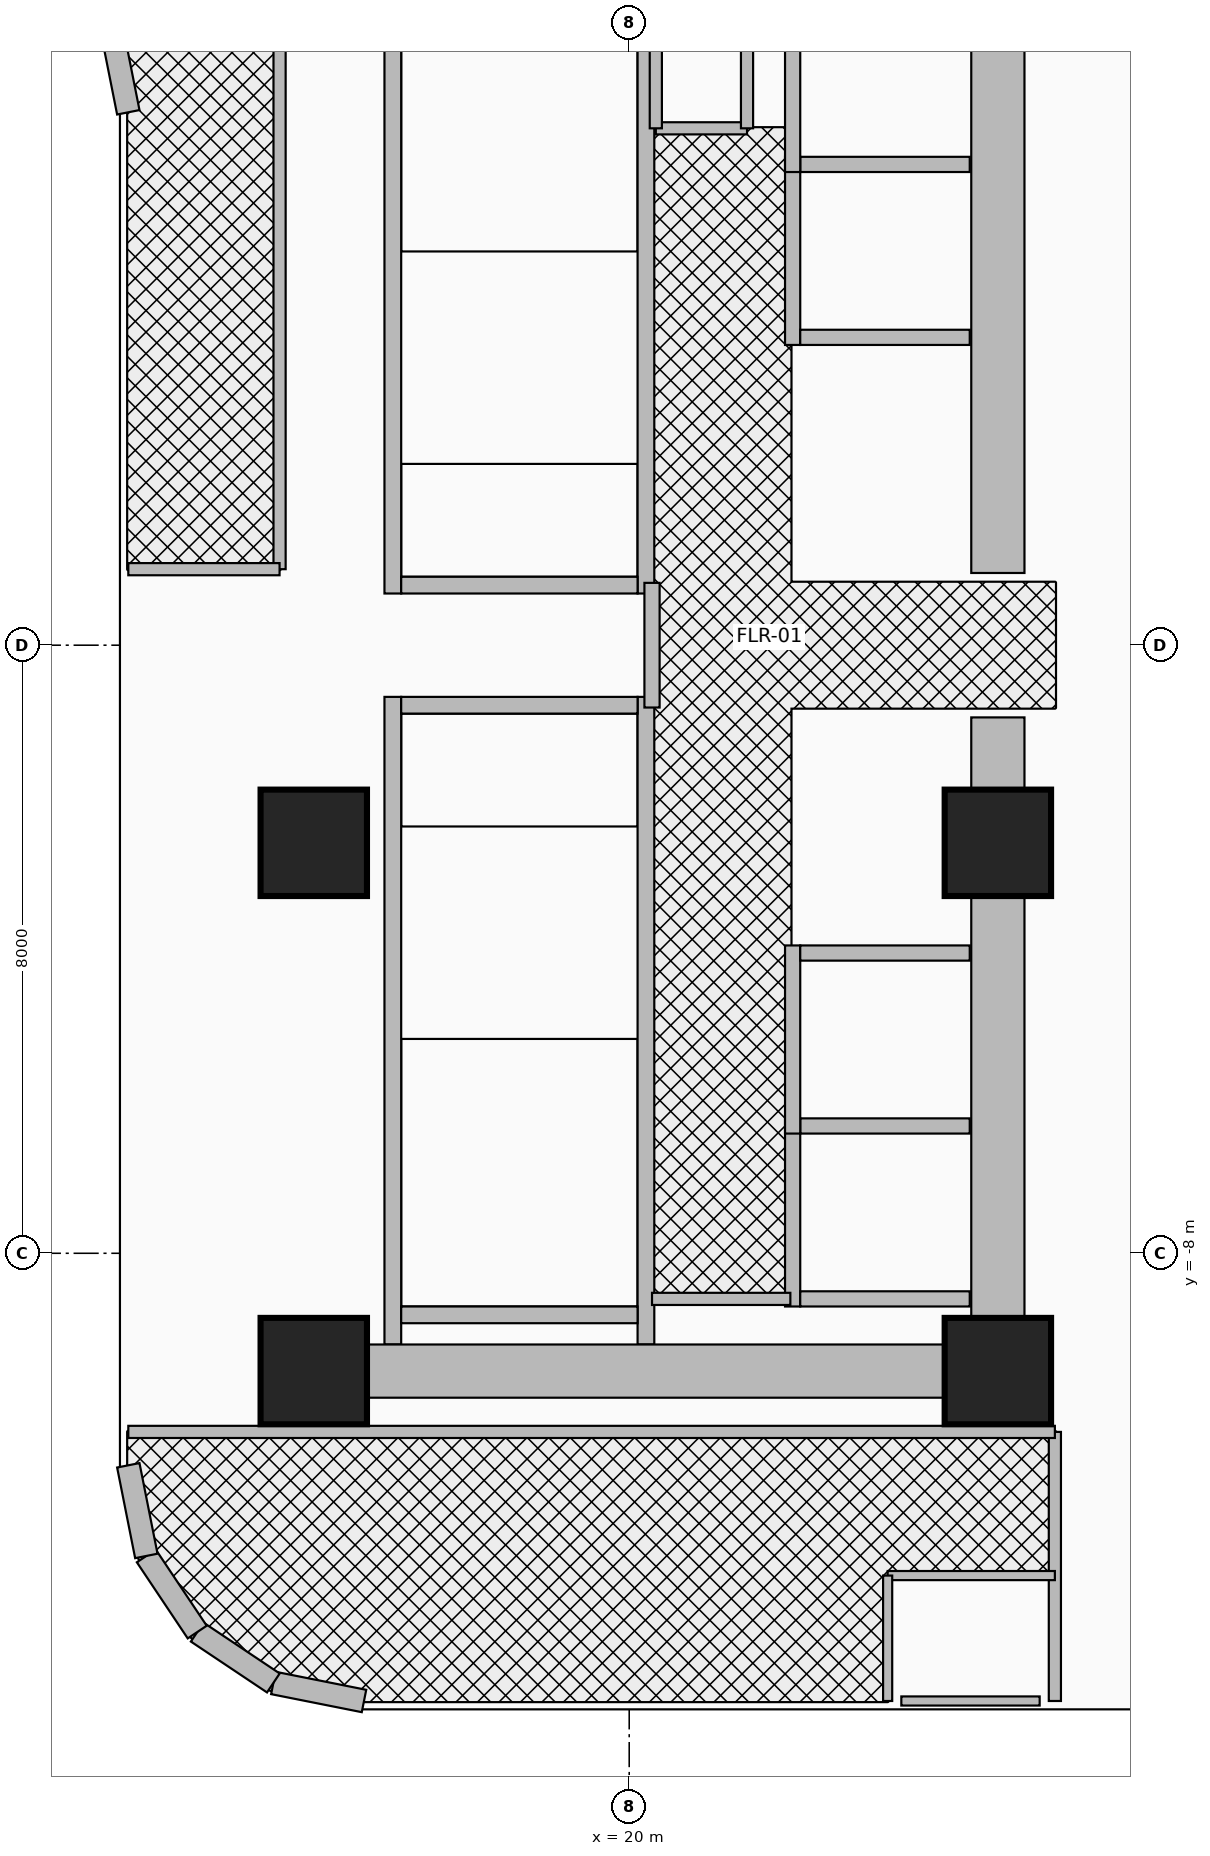
"""IFC4 building model, lengths in metres.
Left out: names, types, materials, properties, quantities, classifications, styles, units other than length and angle.
Written with IfcOpenShell. Run it as: python <this file> out.ifc"""

import sys

from ifc_helpers import new_model, si_unit, direction, frame, frame_2d, origin, origin_2d, place, context, subcontext, project, spatial, rectangle, extrude, source, transform, mapped, element, fill, save


model = new_model("IFC4")
c1 = context("Model", 3, precision=1e-05, world=origin(), true_north=direction((0.0, 1.0)))
c2 = subcontext(c1, "Body", "Model", "MODEL_VIEW")
j1 = project(units=[si_unit("LENGTHUNIT", "METRE"), si_unit("PLANEANGLEUNIT", "RADIAN")], contexts=[c1])
p1 = place(None, origin())
s1 = spatial("IfcSite", under=j1, at=p1, CompositionType="ELEMENT")
p2 = place(p1, origin())
s2 = spatial("IfcBuilding", under=s1, at=p2, CompositionType="ELEMENT")
p3 = place(p2, frame((0.0, 0.0, 26.0)))
s3 = spatial("IfcBuildingStorey", under=s2, at=p3, CompositionType="ELEMENT", Elevation=26.0)
for number, where, z_axis, x_axis in (
    (1, (16.89, 0.68, 0.0), (0.0, 0.0, 1.0), (0.0, 1.0, 0.0)),
    (2, (20.22, 0.68, 0.0), (0.0, 0.0, 1.0), (0.0, 1.0, 0.0)),
):
    element("IfcWall", number, at=place(p3, frame(where, z_axis=z_axis, x_axis=x_axis)), inside=s3, PredefinedType="SHEAR", context=c2, shape_type="SweptSolid", body=[
        extrude(rectangle(XDim=8.52, YDim=0.22, at=frame_2d((4.26, 0.0))), origin(), (0.0, 0.0, 1.0), 3.46),
    ])
p4 = place(p3, frame((17.0, 0.79, 0.0), z_axis=(0.0, 0.0, 1.0), x_axis=(1.0, 0.0, 0.0)))
e3 = element("IfcWall", 3, at=p4, inside=s3, PredefinedType="SHEAR", context=c2, shape_type="SweptSolid", body=[
    extrude(rectangle(XDim=3.11, YDim=0.22, at=frame_2d((1.555, 0.0))), origin(), (0.0, 0.0, 1.0), 3.46),
])
p5 = place(p4, frame((0.95, 0.0, 0.0)))
e4 = element("IfcOpeningElement", 4, at=p5, cuts=e3, PredefinedType="OPENING", context=c2, shape_type="SweptSolid", body=[
    extrude(rectangle(XDim=1.1, YDim=2.15, at=frame_2d((0.55, 1.075))), frame((0.0, 0.125, 0.0), z_axis=(0.0, -1.0, 0.0), x_axis=(1.0, 0.0, 0.0)), (0.0, 0.0, 1.0), 0.25),
])
for number, where, z_axis, x_axis in (
    (5, (16.89, -9.2, 0.0), (0.0, 0.0, 1.0), (0.0, 1.0, 0.0)),
    (6, (20.22, -9.2, 0.0), (0.0, 0.0, 1.0), (0.0, 1.0, 0.0)),
):
    element("IfcWall", number, at=place(p3, frame(where, z_axis=z_axis, x_axis=x_axis)), inside=s3, PredefinedType="SHEAR", context=c2, shape_type="SweptSolid", body=[
        extrude(rectangle(XDim=8.52, YDim=0.22, at=frame_2d((4.26, 0.0))), origin(), (0.0, 0.0, 1.0), 3.46),
    ])
p6 = place(p3, frame((17.0, -8.81, 0.0), z_axis=(0.0, 0.0, 1.0), x_axis=(1.0, 0.0, 0.0)))
e7 = element("IfcWall", 7, at=p6, inside=s3, PredefinedType="SHEAR", context=c2, shape_type="SweptSolid", body=[
    extrude(rectangle(XDim=3.11, YDim=0.22, at=frame_2d((1.555, 0.0))), origin(), (0.0, 0.0, 1.0), 3.46),
])
p7 = place(p3, frame((17.0, -0.79, 0.0), z_axis=(0.0, 0.0, 1.0), x_axis=(1.0, 0.0, 0.0)))
e8 = element("IfcWall", 8, at=p7, inside=s3, PredefinedType="SHEAR", context=c2, shape_type="SweptSolid", body=[
    extrude(rectangle(XDim=3.11, YDim=0.22, at=frame_2d((1.555, 0.0))), origin(), (0.0, 0.0, 1.0), 3.46),
])
p8 = place(p7, frame((0.95, 0.0, 0.0)))
e9 = element("IfcOpeningElement", 9, at=p8, cuts=e8, PredefinedType="OPENING", context=c2, shape_type="SweptSolid", body=[
    extrude(rectangle(XDim=1.1, YDim=2.15, at=frame_2d((0.55, 1.075))), frame((0.0, 0.125, 0.0), z_axis=(0.0, -1.0, 0.0), x_axis=(1.0, 0.0, 0.0)), (0.0, 0.0, 1.0), 0.25),
])
for number, where, z_axis, x_axis in (
    (10, (24.85, -9.9, 0.0), (0.0, 0.0, 1.0), (0.0, 1.0, 0.0)),
    (11, (24.85, 0.95, 0.0), (0.0, 0.0, 1.0), (0.0, 1.0, 0.0)),
):
    element("IfcWall", number, at=place(p3, frame(where, z_axis=z_axis, x_axis=x_axis)), inside=s3, PredefinedType="SHEAR", context=c2, shape_type="SweptSolid", body=[
        extrude(rectangle(XDim=8.95, YDim=0.7, at=frame_2d((4.475, 0.0))), origin(), (0.0, 0.0, 1.0), 3.46),
    ])
p9 = place(p3, frame((15.85, -9.55, 0.0), z_axis=(0.0, 0.0, 1.0), x_axis=(1.0, 0.0, 0.0)))
e12 = element("IfcWall", 12, at=p9, inside=s3, PredefinedType="SHEAR", context=c2, shape_type="SweptSolid", body=[
    extrude(rectangle(XDim=9.0, YDim=0.7, at=frame_2d((4.5, 0.0))), origin(), (0.0, 0.0, 1.0), 3.46),
])
m1 = source(origin(), c2, "Body", "SweptSolid", [
    extrude(rectangle(XDim=1.4, YDim=1.4, at=origin_2d()), origin(), (0.0, 0.0, 1.0), 3.7),
])
for number, where, z_axis, x_axis in (
    (13, (15.85, -9.55, 0.0), (0.0, 0.0, 1.0), (1.0, 0.0, 0.0)),
    (14, (24.85, -9.55, 0.0), (0.0, 0.0, 1.0), (1.0, 0.0, 0.0)),
    (15, (15.85, -2.6, 0.0), (0.0, 0.0, 1.0), (1.0, 0.0, 0.0)),
    (16, (24.85, -2.6, 0.0), (0.0, 0.0, 1.0), (1.0, 0.0, 0.0)),
):
    element("IfcColumn", number, at=place(p3, frame(where, z_axis=z_axis, x_axis=x_axis)), inside=s3, PredefinedType="COLUMN", context=c2, shape_type="MappedRepresentation", body=[
        mapped(m1, transform((0.0, 0.0, 0.0), x_axis=(1.0, 0.0, 0.0), y_axis=(0.0, 1.0, 0.0), z_axis=(0.0, 0.0, 1.0), scale=1.0)),
    ])
p10 = place(p3, frame((16.511, -13.89, 0.0), z_axis=(0.0, 0.0, 1.0), x_axis=(-0.980804027463, 0.194996050505, 0.0)))
e17 = element("IfcWall", 17, at=p10, inside=s3, PredefinedType="SOLIDWALL", context=c2, shape_type="SweptSolid", body=[
    extrude(rectangle(XDim=1.216, YDim=0.3, at=frame_2d((0.608, 0.0))), origin(), (0.0, 0.0, 1.0), 3.46),
])
for number, where, z_axis, x_axis in (
    (18, (15.318, -13.653, 0.0), (0.0, 0.0, 1.0), (-0.831, 0.556, 0.0)),
    (19, (14.317, -12.983, 0.0), (0.0, 0.0, 1.0), (-0.556, 0.831, 0.0)),
):
    element("IfcWall", number, at=place(p3, frame(where, z_axis=z_axis, x_axis=x_axis)), inside=s3, PredefinedType="SOLIDWALL", context=c2, shape_type="SweptSolid", body=[
        extrude(rectangle(XDim=1.205, YDim=0.3, at=frame_2d((0.603, 0.0))), origin(), (0.0, 0.0, 1.0), 3.46),
    ])
p11 = place(p3, frame((13.647, -11.982, 0.0), z_axis=(0.0, 0.0, 1.0), x_axis=(-0.195189223115, 0.980765602568, 0.0)))
e20 = element("IfcWall", 20, at=p11, inside=s3, PredefinedType="SOLIDWALL", context=c2, shape_type="SweptSolid", body=[
    extrude(rectangle(XDim=1.216, YDim=0.3, at=frame_2d((0.608, 0.0))), origin(), (0.0, 0.0, 1.0), 3.46),
])
p12 = place(p3, frame((13.41, 7.011, 0.0), z_axis=(0.0, 0.0, 1.0), x_axis=(-0.195090163074, 0.980785312019, 0.0)))
e21 = element("IfcWall", 21, at=p12, inside=s3, PredefinedType="SOLIDWALL", context=c2, shape_type="SweptSolid", body=[
    extrude(rectangle(XDim=1.281, YDim=0.3, at=frame_2d((0.641, 0.0))), origin(), (0.0, 0.0, 1.0), 3.46),
])
p13 = place(p3, frame((22.15, -8.7, 0.0), z_axis=(0.0, 0.0, 1.0), x_axis=(0.0, 1.0, 0.0)))
e22 = element("IfcWall", 22, at=p13, inside=s3, PredefinedType="MOVABLE", context=c2, shape_type="SweptSolid", body=[
    extrude(rectangle(XDim=2.475, YDim=0.2, at=frame_2d((1.237, 0.0))), origin(), (0.0, 0.0, 1.0), 3.46),
])
p14 = place(p13, frame((0.688, 0.0, 0.0)))
e23 = element("IfcOpeningElement", 23, at=p14, cuts=e22, PredefinedType="OPENING", context=c2, shape_type="SweptSolid", body=[
    extrude(rectangle(XDim=1.1, YDim=2.1, at=frame_2d((0.55, 1.05))), frame((0.0, 0.115, 0.0), z_axis=(0.0, -1.0, 0.0), x_axis=(1.0, 0.0, 0.0)), (0.0, 0.0, 1.0), 0.23),
])
for number, where, z_axis, x_axis in (
    (24, (22.25, -8.6, 0.0), (0.0, 0.0, 1.0), (1.0, 0.0, 0.0)),
    (25, (22.25, -6.325, 0.0), (0.0, 0.0, 1.0), (1.0, 0.0, 0.0)),
):
    element("IfcWall", number, at=place(p3, frame(where, z_axis=z_axis, x_axis=x_axis)), inside=s3, PredefinedType="MOVABLE", context=c2, shape_type="SweptSolid", body=[
        extrude(rectangle(XDim=2.23, YDim=0.2, at=frame_2d((1.115, 0.0))), origin(), (0.0, 0.0, 1.0), 3.46),
    ])
p15 = place(p3, frame((22.15, -6.425, 0.0), z_axis=(0.0, 0.0, 1.0), x_axis=(0.0, 1.0, 0.0)))
e26 = element("IfcWall", 26, at=p15, inside=s3, PredefinedType="MOVABLE", context=c2, shape_type="SweptSolid", body=[
    extrude(rectangle(XDim=2.475, YDim=0.2, at=frame_2d((1.238, 0.0))), origin(), (0.0, 0.0, 1.0), 3.46),
])
p16 = place(p15, frame((0.688, 0.0, 0.0)))
e27 = element("IfcOpeningElement", 27, at=p16, cuts=e26, PredefinedType="OPENING", context=c2, shape_type="SweptSolid", body=[
    extrude(rectangle(XDim=1.1, YDim=2.1, at=frame_2d((0.55, 1.05))), frame((0.0, 0.115, 0.0), z_axis=(0.0, -1.0, 0.0), x_axis=(1.0, 0.0, 0.0)), (0.0, 0.0, 1.0), 0.23),
])
p17 = place(p3, frame((22.25, -4.05, 0.0), z_axis=(0.0, 0.0, 1.0), x_axis=(1.0, 0.0, 0.0)))
e28 = element("IfcWall", 28, at=p17, inside=s3, PredefinedType="MOVABLE", context=c2, shape_type="SweptSolid", body=[
    extrude(rectangle(XDim=2.23, YDim=0.2, at=frame_2d((1.115, 0.0))), origin(), (0.0, 0.0, 1.0), 3.46),
])
p18 = place(p3, frame((22.15, 3.95, 0.0), z_axis=(0.0, 0.0, 1.0), x_axis=(0.0, 1.0, 0.0)))
e29 = element("IfcWall", 29, at=p18, inside=s3, PredefinedType="MOVABLE", context=c2, shape_type="SweptSolid", body=[
    extrude(rectangle(XDim=2.475, YDim=0.2, at=frame_2d((1.238, 0.0))), origin(), (0.0, 0.0, 1.0), 3.46),
])
for number, where, z_axis, x_axis in (
    (30, (22.25, 4.05, 0.0), (0.0, 0.0, 1.0), (1.0, 0.0, 0.0)),
    (31, (22.25, 6.325, 0.0), (0.0, 0.0, 1.0), (1.0, 0.0, 0.0)),
):
    element("IfcWall", number, at=place(p3, frame(where, z_axis=z_axis, x_axis=x_axis)), inside=s3, PredefinedType="MOVABLE", context=c2, shape_type="SweptSolid", body=[
        extrude(rectangle(XDim=2.23, YDim=0.2, at=frame_2d((1.115, 0.0))), origin(), (0.0, 0.0, 1.0), 2.245),
    ])
p19 = place(p3, frame((22.15, 6.225, 0.0), z_axis=(0.0, 0.0, 1.0), x_axis=(0.0, 1.0, 0.0)))
e32 = element("IfcWall", 32, at=p19, inside=s3, PredefinedType="MOVABLE", context=c2, shape_type="SweptSolid", body=[
    extrude(rectangle(XDim=2.475, YDim=0.2, at=frame_2d((1.237, 0.0))), origin(), (0.0, 0.0, 1.0), 3.46),
])
p20 = place(p3, frame((20.3, -0.82, 0.0), z_axis=(0.0, 0.0, 1.0), x_axis=(0.0, 1.0, 0.0)))
e33 = element("IfcWall", 33, at=p20, inside=s3, PredefinedType="PARTITIONING", context=c2, shape_type="SweptSolid", body=[
    extrude(rectangle(XDim=1.64, YDim=0.2, at=frame_2d((0.82, 0.0))), origin(), (0.0, 0.0, 1.0), 3.46),
])
p21 = place(p20, frame((0.295, 0.0, 0.0)))
e34 = element("IfcOpeningElement", 34, at=p21, cuts=e33, PredefinedType="OPENING", context=c2, shape_type="SweptSolid", body=[
    extrude(rectangle(XDim=1.05, YDim=2.15, at=frame_2d((0.525, 1.075))), frame((0.0, 0.115, 0.0), z_axis=(0.0, -1.0, 0.0), x_axis=(1.0, 0.0, 0.0)), (0.0, 0.0, 1.0), 0.23),
])
p22 = place(p3, frame((20.35, 6.8, 0.0), z_axis=(0.0, 0.0, 1.0), x_axis=(1.0, 0.0, 0.0)))
e35 = element("IfcWall", 35, at=p22, inside=s3, PredefinedType="PARTITIONING", context=c2, shape_type="SweptSolid", body=[
    extrude(rectangle(XDim=1.2, YDim=0.16, at=frame_2d((0.6, 0.0))), origin(), (0.0, 0.0, 1.0), 3.46),
])
p23 = place(p22, frame((0.175, 0.0, 0.0)))
e36 = element("IfcOpeningElement", 36, at=p23, cuts=e35, PredefinedType="OPENING", context=c2, shape_type="SweptSolid", body=[
    extrude(rectangle(XDim=0.85, YDim=2.05, at=frame_2d((0.425, 1.025))), frame((0.0, 0.095, 0.0), z_axis=(0.0, -1.0, 0.0), x_axis=(1.0, 0.0, 0.0)), (0.0, 0.0, 1.0), 0.19),
])
for number, where, z_axis, x_axis in (
    (37, (21.55, 6.8, 0.0), (0.0, 0.0, 1.0), (0.0, 1.0, 0.0)),
    (38, (20.35, 6.8, 0.0), (0.0, 0.0, 1.0), (0.0, 1.0, 0.0)),
):
    element("IfcWall", number, at=place(p3, frame(where, z_axis=z_axis, x_axis=x_axis)), inside=s3, PredefinedType="PARTITIONING", context=c2, shape_type="SweptSolid", body=[
        extrude(rectangle(XDim=1.8, YDim=0.16, at=frame_2d((0.9, 0.0))), origin(), (0.0, 0.0, 1.0), 3.46),
    ])
p24 = place(p3, frame((20.3, -8.6, 0.0), z_axis=(0.0, 0.0, 1.0), x_axis=(1.0, 0.0, 0.0)))
e39 = element("IfcWall", 39, at=p24, inside=s3, PredefinedType="PARTITIONING", context=c2, shape_type="SweptSolid", body=[
    extrude(rectangle(XDim=1.82, YDim=0.16, at=frame_2d((0.91, 0.0))), origin(), (0.0, 0.0, 1.0), 3.46),
])
p25 = place(p3, frame((25.6, -13.89, 0.0), z_axis=(0.0, 0.0, 1.0), x_axis=(0.0, 1.0, 0.0)))
e40 = element("IfcWall", 40, at=p25, inside=s3, PredefinedType="PARTITIONING", context=c2, shape_type="SweptSolid", body=[
    extrude(rectangle(XDim=3.54, YDim=0.16, at=frame_2d((1.77, 0.0))), origin(), (0.0, 0.0, 1.0), 3.46),
])
p26 = place(p25, frame((2.12, 0.0, 0.0)))
e41 = element("IfcOpeningElement", 41, at=p26, cuts=e40, PredefinedType="OPENING", context=c2, shape_type="SweptSolid", body=[
    extrude(rectangle(XDim=0.95, YDim=2.15, at=frame_2d((0.475, 1.075))), frame((0.0, 0.095, 0.0), z_axis=(0.0, -1.0, 0.0), x_axis=(1.0, 0.0, 0.0)), (0.0, 0.0, 1.0), 0.19),
])
p27 = place(p3, frame((13.41, -10.35, 0.0), z_axis=(0.0, 0.0, 1.0), x_axis=(1.0, 0.0, 0.0)))
e42 = element("IfcWall", 42, at=p27, inside=s3, PredefinedType="PARTITIONING", context=c2, shape_type="SweptSolid", body=[
    extrude(rectangle(XDim=12.19, YDim=0.16, at=frame_2d((6.095, 0.0))), origin(), (0.0, 0.0, 1.0), 3.46),
])
p28 = place(p3, frame((23.4, -12.24, 0.0), z_axis=(0.0, 0.0, 1.0), x_axis=(1.0, 0.0, 0.0)))
e43 = element("IfcWall", 43, at=p28, inside=s3, PredefinedType="PARTITIONING", context=c2, shape_type="SweptSolid", body=[
    extrude(rectangle(XDim=2.2, YDim=0.12, at=frame_2d((1.1, 0.0))), origin(), (0.0, 0.0, 1.0), 3.46),
])
p29 = place(p3, frame((23.4, -13.89, 0.0), z_axis=(0.0, 0.0, 1.0), x_axis=(0.0, 1.0, 0.0)))
e44 = element("IfcWall", 44, at=p29, inside=s3, PredefinedType="PARTITIONING", context=c2, shape_type="SweptSolid", body=[
    extrude(rectangle(XDim=1.65, YDim=0.12, at=frame_2d((0.825, 0.0))), origin(), (0.0, 0.0, 1.0), 3.46),
])
p30 = place(p29, frame((0.4, 0.0, 0.0)))
e45 = element("IfcOpeningElement", 45, at=p30, cuts=e44, PredefinedType="OPENING", context=c2, shape_type="SweptSolid", body=[
    extrude(rectangle(XDim=0.85, YDim=2.1, at=frame_2d((0.425, 1.05))), frame((0.0, 0.075, 0.0), z_axis=(0.0, -1.0, 0.0), x_axis=(1.0, 0.0, 0.0)), (0.0, 0.0, 1.0), 0.15),
])
p31 = place(p3, frame((23.58, -13.89, 0.0), z_axis=(0.0, 0.0, 1.0), x_axis=(1.0, 0.0, 0.0)))
e46 = element("IfcWall", 46, at=p31, inside=s3, PredefinedType="PARTITIONING", context=c2, shape_type="SweptSolid", body=[
    extrude(rectangle(XDim=1.82, YDim=0.12, at=frame_2d((0.91, 0.0))), origin(), (0.0, 0.0, 1.0), 3.46),
])
p32 = place(p3, frame((15.4, 1.0, 0.0), z_axis=(0.0, 0.0, 1.0), x_axis=(0.0, 1.0, 0.0)))
e47 = element("IfcWall", 47, at=p32, inside=s3, PredefinedType="PARTITIONING", context=c2, shape_type="SweptSolid", body=[
    extrude(rectangle(XDim=9.35, YDim=0.16, at=frame_2d((4.675, 0.0))), origin(), (0.0, 0.0, 1.0), 2.245),
])
p33 = place(p3, frame((13.41, 1.0, 0.0), z_axis=(0.0, 0.0, 1.0), x_axis=(1.0, 0.0, 0.0)))
e48 = element("IfcWall", 48, at=p33, inside=s3, PredefinedType="PARTITIONING", context=c2, shape_type="SweptSolid", body=[
    extrude(rectangle(XDim=1.99, YDim=0.16, at=frame_2d((0.995, 0.0))), origin(), (0.0, 0.0, 1.0), 2.245),
])
p34 = place(p14, origin())
e49 = element("IfcDoor", 49, at=p34, inside=s3, OperationType="DOUBLE_DOOR_SLIDING", PredefinedType="DOOR", context=c2, shape_type="SweptSolid", body=[
    extrude(rectangle(XDim=1.1, YDim=2.1, at=frame_2d((0.55, 1.05))), frame((0.0, 0.025, 0.0), z_axis=(0.0, -1.0, 0.0), x_axis=(1.0, 0.0, 0.0)), (0.0, 0.0, 1.0), 0.05),
])
fill(e23, e49)
p35 = place(p16, origin())
e50 = element("IfcDoor", 50, at=p35, inside=s3, OperationType="DOUBLE_DOOR_SLIDING", PredefinedType="DOOR", context=c2, shape_type="SweptSolid", body=[
    extrude(rectangle(XDim=1.1, YDim=2.1, at=frame_2d((0.55, 1.05))), frame((0.0, 0.025, 0.0), z_axis=(0.0, -1.0, 0.0), x_axis=(1.0, 0.0, 0.0)), (0.0, 0.0, 1.0), 0.05),
])
fill(e27, e50)
p36 = place(p21, origin())
e51 = element("IfcDoor", 51, at=p36, inside=s3, OperationType="SINGLE_SWING_RIGHT", PredefinedType="DOOR", context=c2, shape_type="SweptSolid", body=[
    extrude(rectangle(XDim=1.05, YDim=2.15, at=frame_2d((0.525, 1.075))), frame((0.0, 0.025, 0.0), z_axis=(0.0, -1.0, 0.0), x_axis=(1.0, 0.0, 0.0)), (0.0, 0.0, 1.0), 0.05),
])
fill(e34, e51)
p37 = place(p5, frame((1.1, 0.0, 0.0), z_axis=(0.0, 0.0, 1.0), x_axis=(-1.0, 0.0, 0.0)))
e52 = element("IfcDoor", 52, at=p37, inside=s3, OperationType="SINGLE_SWING_LEFT", PredefinedType="DOOR", context=c2, shape_type="SweptSolid", body=[
    extrude(rectangle(XDim=1.1, YDim=2.15, at=frame_2d((0.55, 1.075))), frame((0.0, 0.025, 0.0), z_axis=(0.0, -1.0, 0.0), x_axis=(1.0, 0.0, 0.0)), (0.0, 0.0, 1.0), 0.05),
])
fill(e4, e52)
p38 = place(p8, origin())
e53 = element("IfcDoor", 53, at=p38, inside=s3, OperationType="SINGLE_SWING_RIGHT", PredefinedType="DOOR", context=c2, shape_type="SweptSolid", body=[
    extrude(rectangle(XDim=1.1, YDim=2.15, at=frame_2d((0.55, 1.075))), frame((0.0, 0.025, 0.0), z_axis=(0.0, -1.0, 0.0), x_axis=(1.0, 0.0, 0.0)), (0.0, 0.0, 1.0), 0.05),
])
fill(e9, e53)
p39 = place(p23, origin())
e54 = element("IfcDoor", 54, at=p39, inside=s3, OperationType="SINGLE_SWING_LEFT", PredefinedType="DOOR", context=c2, shape_type="SweptSolid", body=[
    extrude(rectangle(XDim=0.85, YDim=2.05, at=frame_2d((0.425, 1.025))), frame((0.0, 0.025, 0.0), z_axis=(0.0, -1.0, 0.0), x_axis=(1.0, 0.0, 0.0)), (0.0, 0.0, 1.0), 0.05),
])
fill(e36, e54)
p40 = place(p26, frame((0.95, 0.0, 0.0), z_axis=(0.0, 0.0, 1.0), x_axis=(-1.0, 0.0, 0.0)))
e55 = element("IfcDoor", 55, at=p40, inside=s3, OperationType="SINGLE_SWING_LEFT", PredefinedType="DOOR", context=c2, shape_type="SweptSolid", body=[
    extrude(rectangle(XDim=0.95, YDim=2.15, at=frame_2d((0.475, 1.075))), frame((0.0, 0.025, 0.0), z_axis=(0.0, -1.0, 0.0), x_axis=(1.0, 0.0, 0.0)), (0.0, 0.0, 1.0), 0.05),
])
fill(e41, e55)
p41 = place(p30, origin())
e56 = element("IfcDoor", 56, at=p41, inside=s3, OperationType="SINGLE_SWING_RIGHT", PredefinedType="DOOR", context=c2, shape_type="SweptSolid", body=[
    extrude(rectangle(XDim=0.85, YDim=2.1, at=frame_2d((0.425, 1.05))), frame((0.0, 0.025, 0.0), z_axis=(0.0, -1.0, 0.0), x_axis=(1.0, 0.0, 0.0)), (0.0, 0.0, 1.0), 0.05),
])
fill(e45, e56)
save(model, sys.argv[1])
